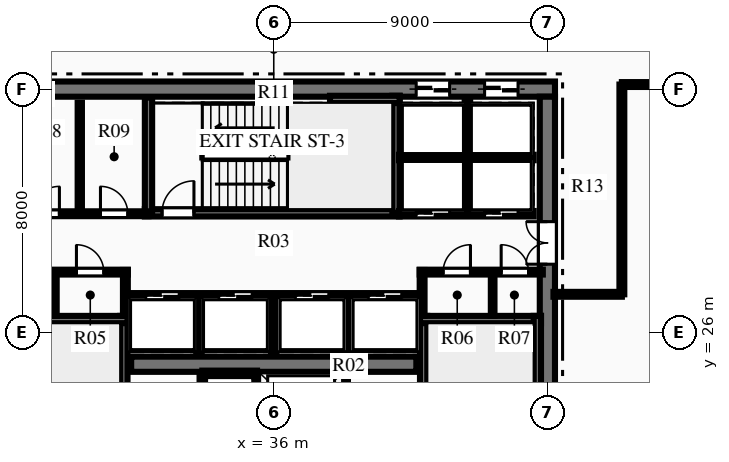
"""IFC4 building model, lengths in metres.
Left out: names, types, materials, properties, quantities, classifications, styles, units other than length and angle.
Written with IfcOpenShell. Run it as: python <this file> out.ifc"""

import sys

from ifc_helpers import new_model, si_unit, direction, frame, frame_2d, origin, place, context, subcontext, project, spatial, rectangle, extrude, element, fill, save


model = new_model("IFC4")
c1 = context("Model", 3, precision=1e-05, world=origin(), true_north=direction((0.0, 1.0)))
c2 = subcontext(c1, "Body", "Model", "MODEL_VIEW")
j1 = project(units=[si_unit("LENGTHUNIT", "METRE"), si_unit("PLANEANGLEUNIT", "RADIAN")], contexts=[c1])
p1 = place(None, origin())
s1 = spatial("IfcSite", under=j1, at=p1, CompositionType="ELEMENT")
p2 = place(p1, origin())
s2 = spatial("IfcBuilding", under=s1, at=p2, CompositionType="ELEMENT")
p3 = place(p2, frame((0.0, 0.0, 155.7)))
s3 = spatial("IfcBuildingStorey", under=s2, at=p3, CompositionType="ELEMENT", Elevation=155.7)
p4 = place(p3, frame((26.75, 34.0, 0.0), z_axis=(0.0, 0.0, 1.0), x_axis=(1.0, 0.0, 0.0)))
e1 = element("IfcWall", 1, at=p4, inside=s3, PredefinedType="SHEAR", context=c2, shape_type="SweptSolid", body=[
    extrude(rectangle(XDim=18.5, YDim=0.5, at=frame_2d((9.25, 0.0))), origin(), (0.0, 0.0, 1.0), 3.75),
])
p5 = place(p4, frame((13.935, 0.0, 0.0)))
e2 = element("IfcOpeningElement", 2, at=p5, cuts=e1, PredefinedType="OPENING", context=c2, shape_type="SweptSolid", body=[
    extrude(rectangle(XDim=1.1, YDim=2.15, at=frame_2d((0.55, 1.075))), frame((0.0, 0.26, 0.0), z_axis=(0.0, -1.0, 0.0), x_axis=(1.0, 0.0, 0.0)), (0.0, 0.0, 1.0), 0.52),
])
p6 = place(p4, frame((16.185, 0.0, 0.0)))
e3 = element("IfcOpeningElement", 3, at=p6, cuts=e1, PredefinedType="OPENING", context=c2, shape_type="SweptSolid", body=[
    extrude(rectangle(XDim=1.1, YDim=2.15, at=frame_2d((0.55, 1.075))), frame((0.0, 0.26, 0.0), z_axis=(0.0, -1.0, 0.0), x_axis=(1.0, 0.0, 0.0)), (0.0, 0.0, 1.0), 0.52),
])
p7 = place(p3, frame((45.0, 18.25, 0.0), z_axis=(0.0, 0.0, 1.0), x_axis=(0.0, 1.0, 0.0)))
e4 = element("IfcWall", 4, at=p7, inside=s3, PredefinedType="SHEAR", context=c2, shape_type="SweptSolid", body=[
    extrude(rectangle(XDim=15.5, YDim=0.5, at=frame_2d((7.75, 0.0))), origin(), (0.0, 0.0, 1.0), 3.75),
])
p8 = place(p7, frame((9.99, 0.0, 0.0)))
e5 = element("IfcOpeningElement", 5, at=p8, cuts=e4, PredefinedType="OPENING", context=c2, shape_type="SweptSolid", body=[
    extrude(rectangle(XDim=1.4, YDim=2.2, at=frame_2d((0.7, 1.1))), frame((0.0, 0.26, 0.0), z_axis=(0.0, -1.0, 0.0), x_axis=(1.0, 0.0, 0.0)), (0.0, 0.0, 1.0), 0.52),
])
p9 = place(p3, frame((31.31, 24.95, 0.0), z_axis=(0.0, 0.0, 1.0), x_axis=(1.0, 0.0, 0.0)))
e6 = element("IfcWall", 6, at=p9, inside=s3, PredefinedType="SHEAR", context=c2, shape_type="SweptSolid", body=[
    extrude(rectangle(XDim=9.38, YDim=0.5, at=frame_2d((4.69, 0.0))), origin(), (0.0, 0.0, 1.0), 3.75),
])
p10 = place(p3, frame((31.07, 18.28, 0.0), z_axis=(0.0, 0.0, 1.0), x_axis=(0.0, 1.0, 0.0)))
e7 = element("IfcWall", 7, at=p10, inside=s3, PredefinedType="SHEAR", context=c2, shape_type="SweptSolid", body=[
    extrude(rectangle(XDim=8.26, YDim=0.24, at=frame_2d((4.13, 0.0))), origin(), (0.0, 0.0, 1.0), 3.75),
])
p11 = place(p10, frame((0.365, 0.0, 0.0)))
e8 = element("IfcOpeningElement", 8, at=p11, cuts=e7, PredefinedType="OPENING", context=c2, shape_type="SweptSolid", body=[
    extrude(rectangle(XDim=1.05, YDim=2.15, at=frame_2d((0.525, 1.075))), frame((0.0, 0.13, 0.0), z_axis=(0.0, -1.0, 0.0), x_axis=(1.0, 0.0, 0.0)), (0.0, 0.0, 1.0), 0.26),
])
p12 = place(p3, frame((27.21, 26.42, 0.0), z_axis=(0.0, 0.0, 1.0), x_axis=(1.0, 0.0, 0.0)))
e9 = element("IfcWall", 9, at=p12, inside=s3, PredefinedType="SHEAR", context=c2, shape_type="SweptSolid", body=[
    extrude(rectangle(XDim=3.98, YDim=0.24, at=frame_2d((1.99, 0.0))), origin(), (0.0, 0.0, 1.0), 3.75),
])
p13 = place(p3, frame((40.93, 18.28, 0.0), z_axis=(0.0, 0.0, 1.0), x_axis=(0.0, 1.0, 0.0)))
e10 = element("IfcWall", 10, at=p13, inside=s3, PredefinedType="SHEAR", context=c2, shape_type="SweptSolid", body=[
    extrude(rectangle(XDim=8.26, YDim=0.24, at=frame_2d((4.13, 0.0))), origin(), (0.0, 0.0, 1.0), 3.75),
])
p14 = place(p13, frame((0.365, 0.0, 0.0)))
e11 = element("IfcOpeningElement", 11, at=p14, cuts=e10, PredefinedType="OPENING", context=c2, shape_type="SweptSolid", body=[
    extrude(rectangle(XDim=1.05, YDim=2.15, at=frame_2d((0.525, 1.075))), frame((0.0, 0.13, 0.0), z_axis=(0.0, -1.0, 0.0), x_axis=(1.0, 0.0, 0.0)), (0.0, 0.0, 1.0), 0.26),
])
p15 = place(p3, frame((40.81, 26.42, 0.0), z_axis=(0.0, 0.0, 1.0), x_axis=(1.0, 0.0, 0.0)))
e12 = element("IfcWall", 12, at=p15, inside=s3, PredefinedType="SHEAR", context=c2, shape_type="SweptSolid", body=[
    extrude(rectangle(XDim=3.98, YDim=0.24, at=frame_2d((1.99, 0.0))), origin(), (0.0, 0.0, 1.0), 3.75),
])
p16 = place(p3, frame((44.67, 18.28, 0.0), z_axis=(0.0, 0.0, 1.0), x_axis=(0.0, 1.0, 0.0)))
e13 = element("IfcWall", 13, at=p16, inside=s3, PredefinedType="SHEAR", context=c2, shape_type="SweptSolid", body=[
    extrude(rectangle(XDim=8.26, YDim=0.24, at=frame_2d((4.13, 0.0))), origin(), (0.0, 0.0, 1.0), 3.75),
])
p17 = place(p3, frame((31.76, 29.93, 0.0), z_axis=(0.0, 0.0, 1.0), x_axis=(1.0, 0.0, 0.0)))
e14 = element("IfcWall", 14, at=p17, inside=s3, PredefinedType="SHEAR", context=c2, shape_type="SweptSolid", body=[
    extrude(rectangle(XDim=8.38, YDim=0.24, at=frame_2d((4.19, 0.0))), origin(), (0.0, 0.0, 1.0), 3.75),
])
p18 = place(p17, frame((0.565, 0.0, 0.0)))
e15 = element("IfcOpeningElement", 15, at=p18, cuts=e14, PredefinedType="OPENING", context=c2, shape_type="SweptSolid", body=[
    extrude(rectangle(XDim=1.05, YDim=2.15, at=frame_2d((0.525, 1.075))), frame((0.0, 0.13, 0.0), z_axis=(0.0, -1.0, 0.0), x_axis=(1.0, 0.0, 0.0)), (0.0, 0.0, 1.0), 0.26),
])
p19 = place(p3, frame((31.88, 29.93, 0.0), z_axis=(0.0, 0.0, 1.0), x_axis=(0.0, 1.0, 0.0)))
e16 = element("IfcWall", 16, at=p19, inside=s3, PredefinedType="SHEAR", context=c2, shape_type="SweptSolid", body=[
    extrude(rectangle(XDim=3.79, YDim=0.24, at=frame_2d((1.895, 0.0))), origin(), (0.0, 0.0, 1.0), 3.75),
])
p20 = place(p3, frame((40.02, 29.93, 0.0), z_axis=(0.0, 0.0, 1.0), x_axis=(0.0, 1.0, 0.0)))
e17 = element("IfcWall", 17, at=p20, inside=s3, PredefinedType="SHEAR", context=c2, shape_type="SweptSolid", body=[
    extrude(rectangle(XDim=3.85, YDim=0.24, at=frame_2d((1.925, 0.0))), origin(), (0.0, 0.0, 1.0), 3.75),
])
p21 = place(p3, frame((37.85, 33.66, 0.0), z_axis=(0.0, 0.0, 1.0), x_axis=(1.0, 0.0, 0.0)))
e18 = element("IfcWall", 18, at=p21, inside=s3, PredefinedType="SHEAR", context=c2, shape_type="SweptSolid", body=[
    extrude(rectangle(XDim=2.29, YDim=0.24, at=frame_2d((1.145, 0.0))), origin(), (0.0, 0.0, 1.0), 3.75),
])
for number, where, z_axis, x_axis in (
    (19, (33.65, 22.05, 0.0), (0.0, 0.0, 1.0), (0.0, 1.0, 0.0)),
    (20, (35.45, 22.05, 0.0), (0.0, 0.0, 1.0), (0.0, 1.0, 0.0)),
):
    element("IfcWall", number, at=place(p3, frame(where, z_axis=z_axis, x_axis=x_axis)), inside=s3, PredefinedType="PARTITIONING", context=c2, shape_type="SweptSolid", body=[
        extrude(rectangle(XDim=2.6, YDim=0.18, at=frame_2d((1.3, 0.0))), origin(), (0.0, 0.0, 1.0), 3.46),
    ])
p22 = place(p3, frame((33.65, 24.65, 0.0), z_axis=(0.0, 0.0, 1.0), x_axis=(1.0, 0.0, 0.0)))
e21 = element("IfcWall", 21, at=p22, inside=s3, PredefinedType="PARTITIONING", context=c2, shape_type="SweptSolid", body=[
    extrude(rectangle(XDim=1.8, YDim=0.18, at=frame_2d((0.9, 0.0))), origin(), (0.0, 0.0, 1.0), 3.46),
])
p23 = place(p3, frame((38.35, 22.05, 0.0), z_axis=(0.0, 0.0, 1.0), x_axis=(0.0, 1.0, 0.0)))
e22 = element("IfcWall", 22, at=p23, inside=s3, PredefinedType="PARTITIONING", context=c2, shape_type="SweptSolid", body=[
    extrude(rectangle(XDim=2.6, YDim=0.18, at=frame_2d((1.3, 0.0))), origin(), (0.0, 0.0, 1.0), 3.46),
])
p24 = place(p3, frame((27.15, 27.98, 0.0), z_axis=(0.0, 0.0, 1.0), x_axis=(1.0, 0.0, 0.0)))
e23 = element("IfcWall", 23, at=p24, inside=s3, PredefinedType="PARTITIONING", context=c2, shape_type="SweptSolid", body=[
    extrude(rectangle(XDim=4.05, YDim=0.16, at=frame_2d((2.025, 0.0))), origin(), (0.0, 0.0, 1.0), 3.46),
])
p25 = place(p24, frame((0.47, 0.0, 0.0)))
e24 = element("IfcOpeningElement", 24, at=p25, cuts=e23, PredefinedType="OPENING", context=c2, shape_type="SweptSolid", body=[
    extrude(rectangle(XDim=0.9, YDim=2.15, at=frame_2d((0.45, 1.075))), frame((0.0, 0.09, 0.0), z_axis=(0.0, -1.0, 0.0), x_axis=(1.0, 0.0, 0.0)), (0.0, 0.0, 1.0), 0.18),
])
p26 = place(p24, frame((2.36, 0.0, 0.0)))
e25 = element("IfcOpeningElement", 25, at=p26, cuts=e23, PredefinedType="OPENING", context=c2, shape_type="SweptSolid", body=[
    extrude(rectangle(XDim=0.9, YDim=2.15, at=frame_2d((0.45, 1.075))), frame((0.0, 0.09, 0.0), z_axis=(0.0, -1.0, 0.0), x_axis=(1.0, 0.0, 0.0)), (0.0, 0.0, 1.0), 0.18),
])
p27 = place(p3, frame((31.12, 26.54, 0.0), z_axis=(0.0, 0.0, 1.0), x_axis=(0.0, 1.0, 0.0)))
e26 = element("IfcWall", 26, at=p27, inside=s3, PredefinedType="PARTITIONING", context=c2, shape_type="SweptSolid", body=[
    extrude(rectangle(XDim=1.51, YDim=0.16, at=frame_2d((0.755, 0.0))), origin(), (0.0, 0.0, 1.0), 3.46),
])
p28 = place(p3, frame((40.8, 27.98, 0.0), z_axis=(0.0, 0.0, 1.0), x_axis=(1.0, 0.0, 0.0)))
e27 = element("IfcWall", 27, at=p28, inside=s3, PredefinedType="PARTITIONING", context=c2, shape_type="SweptSolid", body=[
    extrude(rectangle(XDim=4.05, YDim=0.16, at=frame_2d((2.025, 0.0))), origin(), (0.0, 0.0, 1.0), 3.46),
])
p29 = place(p28, frame((0.77, 0.0, 0.0)))
e28 = element("IfcOpeningElement", 28, at=p29, cuts=e27, PredefinedType="OPENING", context=c2, shape_type="SweptSolid", body=[
    extrude(rectangle(XDim=0.9, YDim=2.15, at=frame_2d((0.45, 1.075))), frame((0.0, 0.09, 0.0), z_axis=(0.0, -1.0, 0.0), x_axis=(1.0, 0.0, 0.0)), (0.0, 0.0, 1.0), 0.18),
])
p30 = place(p28, frame((2.68, 0.0, 0.0)))
e29 = element("IfcOpeningElement", 29, at=p30, cuts=e27, PredefinedType="OPENING", context=c2, shape_type="SweptSolid", body=[
    extrude(rectangle(XDim=0.9, YDim=2.15, at=frame_2d((0.45, 1.075))), frame((0.0, 0.09, 0.0), z_axis=(0.0, -1.0, 0.0), x_axis=(1.0, 0.0, 0.0)), (0.0, 0.0, 1.0), 0.18),
])
p31 = place(p3, frame((40.88, 26.54, 0.0), z_axis=(0.0, 0.0, 1.0), x_axis=(0.0, 1.0, 0.0)))
e30 = element("IfcWall", 30, at=p31, inside=s3, PredefinedType="PARTITIONING", context=c2, shape_type="SweptSolid", body=[
    extrude(rectangle(XDim=1.51, YDim=0.16, at=frame_2d((0.755, 0.0))), origin(), (0.0, 0.0, 1.0), 3.46),
])
for number, where, z_axis, x_axis in (
    (31, (28.8, 26.54, 0.0), (0.0, 0.0, 1.0), (0.0, 1.0, 0.0)),
    (32, (43.2, 26.54, 0.0), (0.0, 0.0, 1.0), (0.0, 1.0, 0.0)),
):
    element("IfcWall", number, at=place(p3, frame(where, z_axis=z_axis, x_axis=x_axis)), inside=s3, PredefinedType="PARTITIONING", context=c2, shape_type="SweptSolid", body=[
        extrude(rectangle(XDim=1.44, YDim=0.12, at=frame_2d((0.72, 0.0))), origin(), (0.0, 0.0, 1.0), 3.46),
    ])
p32 = place(p3, frame((27.45, 29.9, 0.0), z_axis=(0.0, 0.0, 1.0), x_axis=(1.0, 0.0, 0.0)))
e33 = element("IfcWall", 33, at=p32, inside=s3, PredefinedType="PARTITIONING", context=c2, shape_type="SweptSolid", body=[
    extrude(rectangle(XDim=4.43, YDim=0.16, at=frame_2d((2.215, 0.0))), origin(), (0.0, 0.0, 1.0), 3.46),
])
p33 = place(p32, frame((0.6, 0.0, 0.0)))
e34 = element("IfcOpeningElement", 34, at=p33, cuts=e33, PredefinedType="OPENING", context=c2, shape_type="SweptSolid", body=[
    extrude(rectangle(XDim=0.9, YDim=2.15, at=frame_2d((0.45, 1.075))), frame((0.0, 0.09, 0.0), z_axis=(0.0, -1.0, 0.0), x_axis=(1.0, 0.0, 0.0)), (0.0, 0.0, 1.0), 0.18),
])
p34 = place(p32, frame((2.85, 0.0, 0.0)))
e35 = element("IfcOpeningElement", 35, at=p34, cuts=e33, PredefinedType="OPENING", context=c2, shape_type="SweptSolid", body=[
    extrude(rectangle(XDim=0.9, YDim=2.15, at=frame_2d((0.45, 1.075))), frame((0.0, 0.09, 0.0), z_axis=(0.0, -1.0, 0.0), x_axis=(1.0, 0.0, 0.0)), (0.0, 0.0, 1.0), 0.18),
])
p35 = place(p3, frame((29.62, 29.95, 0.0), z_axis=(0.0, 0.0, 1.0), x_axis=(0.0, 1.0, 0.0)))
e36 = element("IfcWall", 36, at=p35, inside=s3, PredefinedType="PARTITIONING", context=c2, shape_type="SweptSolid", body=[
    extrude(rectangle(XDim=3.6, YDim=0.14, at=frame_2d((1.8, 0.0))), origin(), (0.0, 0.0, 1.0), 3.46),
])
p36 = place(p3, frame((40.12, 29.9, 0.0), z_axis=(0.0, 0.0, 1.0), x_axis=(1.0, 0.0, 0.0)))
e37 = element("IfcWall", 37, at=p36, inside=s3, PredefinedType="PARTITIONING", context=c2, shape_type="SweptSolid", body=[
    extrude(rectangle(XDim=4.43, YDim=0.18, at=frame_2d((2.215, 0.0))), origin(), (0.0, 0.0, 1.0), 3.46),
])
p37 = place(p36, frame((0.565, 0.0, 0.0)))
e38 = element("IfcOpeningElement", 38, at=p37, cuts=e37, PredefinedType="OPENING", context=c2, shape_type="SweptSolid", body=[
    extrude(rectangle(XDim=1.1, YDim=2.15, at=frame_2d((0.55, 1.075))), frame((0.0, 0.1, 0.0), z_axis=(0.0, -1.0, 0.0), x_axis=(1.0, 0.0, 0.0)), (0.0, 0.0, 1.0), 0.2),
])
p38 = place(p36, frame((2.815, 0.0, 0.0)))
e39 = element("IfcOpeningElement", 39, at=p38, cuts=e37, PredefinedType="OPENING", context=c2, shape_type="SweptSolid", body=[
    extrude(rectangle(XDim=1.1, YDim=2.15, at=frame_2d((0.55, 1.075))), frame((0.0, 0.1, 0.0), z_axis=(0.0, -1.0, 0.0), x_axis=(1.0, 0.0, 0.0)), (0.0, 0.0, 1.0), 0.2),
])
p39 = place(p3, frame((40.12, 31.75, 0.0), z_axis=(0.0, 0.0, 1.0), x_axis=(1.0, 0.0, 0.0)))
e40 = element("IfcWall", 40, at=p39, inside=s3, PredefinedType="PARTITIONING", context=c2, shape_type="SweptSolid", body=[
    extrude(rectangle(XDim=4.43, YDim=0.18, at=frame_2d((2.215, 0.0))), origin(), (0.0, 0.0, 1.0), 3.46),
])
p40 = place(p3, frame((42.37, 29.9, 0.0), z_axis=(0.0, 0.0, 1.0), x_axis=(0.0, 1.0, 0.0)))
e41 = element("IfcWall", 41, at=p40, inside=s3, PredefinedType="PARTITIONING", context=c2, shape_type="SweptSolid", body=[
    extrude(rectangle(XDim=3.75, YDim=0.18, at=frame_2d((1.875, 0.0))), origin(), (0.0, 0.0, 1.0), 3.46),
])
p41 = place(p3, frame((31.2, 27.2, 0.0), z_axis=(0.0, 0.0, 1.0), x_axis=(1.0, 0.0, 0.0)))
e42 = element("IfcWall", 42, at=p41, inside=s3, PredefinedType="PARTITIONING", context=c2, shape_type="SweptSolid", body=[
    extrude(rectangle(XDim=9.6, YDim=0.18, at=frame_2d((4.8, 0.0))), origin(), (0.0, 0.0, 1.0), 3.46),
])
p42 = place(p41, frame((0.59, 0.0, 0.0)))
e43 = element("IfcOpeningElement", 43, at=p42, cuts=e42, PredefinedType="OPENING", context=c2, shape_type="SweptSolid", body=[
    extrude(rectangle(XDim=1.1, YDim=2.15, at=frame_2d((0.55, 1.075))), frame((0.0, 0.1, 0.0), z_axis=(0.0, -1.0, 0.0), x_axis=(1.0, 0.0, 0.0)), (0.0, 0.0, 1.0), 0.2),
])
p43 = place(p41, frame((2.99, 0.0, 0.0)))
e44 = element("IfcOpeningElement", 44, at=p43, cuts=e42, PredefinedType="OPENING", context=c2, shape_type="SweptSolid", body=[
    extrude(rectangle(XDim=1.1, YDim=2.15, at=frame_2d((0.55, 1.075))), frame((0.0, 0.1, 0.0), z_axis=(0.0, -1.0, 0.0), x_axis=(1.0, 0.0, 0.0)), (0.0, 0.0, 1.0), 0.2),
])
p44 = place(p41, frame((5.51, 0.0, 0.0)))
e45 = element("IfcOpeningElement", 45, at=p44, cuts=e42, PredefinedType="OPENING", context=c2, shape_type="SweptSolid", body=[
    extrude(rectangle(XDim=1.1, YDim=2.15, at=frame_2d((0.55, 1.075))), frame((0.0, 0.1, 0.0), z_axis=(0.0, -1.0, 0.0), x_axis=(1.0, 0.0, 0.0)), (0.0, 0.0, 1.0), 0.2),
])
p45 = place(p41, frame((7.91, 0.0, 0.0)))
e46 = element("IfcOpeningElement", 46, at=p45, cuts=e42, PredefinedType="OPENING", context=c2, shape_type="SweptSolid", body=[
    extrude(rectangle(XDim=1.1, YDim=2.15, at=frame_2d((0.55, 1.075))), frame((0.0, 0.1, 0.0), z_axis=(0.0, -1.0, 0.0), x_axis=(1.0, 0.0, 0.0)), (0.0, 0.0, 1.0), 0.2),
])
for number, where, z_axis, x_axis in (
    (47, (33.54, 25.3, 0.0), (0.0, 0.0, 1.0), (0.0, 1.0, 0.0)),
    (48, (36.0, 25.3, 0.0), (0.0, 0.0, 1.0), (0.0, 1.0, 0.0)),
    (49, (38.46, 25.3, 0.0), (0.0, 0.0, 1.0), (0.0, 1.0, 0.0)),
):
    element("IfcWall", number, at=place(p3, frame(where, z_axis=z_axis, x_axis=x_axis)), inside=s3, PredefinedType="PARTITIONING", context=c2, shape_type="SweptSolid", body=[
        extrude(rectangle(XDim=1.9, YDim=0.18, at=frame_2d((0.95, 0.0))), origin(), (0.0, 0.0, 1.0), 3.46),
    ])
p46 = place(p3, frame((47.45, 34.15, 0.0), z_axis=(0.0, 0.0, 1.0), x_axis=(1.0, 0.0, 0.0)))
e50 = element("IfcWall", 50, at=p46, inside=s3, PredefinedType="PARTITIONING", context=c2, shape_type="SweptSolid", body=[
    extrude(rectangle(XDim=6.35, YDim=0.16, at=frame_2d((3.175, 0.0))), origin(), (0.0, 0.0, 1.0), 3.46),
])
p47 = place(p3, frame((47.45, 27.25, 0.0), z_axis=(0.0, 0.0, 1.0), x_axis=(0.0, 1.0, 0.0)))
e51 = element("IfcWall", 51, at=p47, inside=s3, PredefinedType="PARTITIONING", context=c2, shape_type="SweptSolid", body=[
    extrude(rectangle(XDim=6.9, YDim=0.16, at=frame_2d((3.45, 0.0))), origin(), (0.0, 0.0, 1.0), 3.46),
])
p48 = place(p3, frame((45.2, 27.25, 0.0), z_axis=(0.0, 0.0, 1.0), x_axis=(1.0, 0.0, 0.0)))
e52 = element("IfcWall", 52, at=p48, inside=s3, PredefinedType="PARTITIONING", context=c2, shape_type="SweptSolid", body=[
    extrude(rectangle(XDim=2.25, YDim=0.16, at=frame_2d((1.125, 0.0))), origin(), (0.0, 0.0, 1.0), 3.46),
])
p49 = place(p26, origin())
e53 = element("IfcDoor", 53, at=p49, inside=s3, OperationType="SINGLE_SWING_LEFT", PredefinedType="DOOR", context=c2, shape_type="SweptSolid", body=[
    extrude(rectangle(XDim=0.9, YDim=2.15, at=frame_2d((0.45, 1.075))), frame((0.0, 0.025, 0.0), z_axis=(0.0, -1.0, 0.0), x_axis=(1.0, 0.0, 0.0)), (0.0, 0.0, 1.0), 0.05),
])
fill(e25, e53)
p50 = place(p29, origin())
e54 = element("IfcDoor", 54, at=p50, inside=s3, OperationType="SINGLE_SWING_RIGHT", PredefinedType="DOOR", context=c2, shape_type="SweptSolid", body=[
    extrude(rectangle(XDim=0.9, YDim=2.15, at=frame_2d((0.45, 1.075))), frame((0.0, 0.025, 0.0), z_axis=(0.0, -1.0, 0.0), x_axis=(1.0, 0.0, 0.0)), (0.0, 0.0, 1.0), 0.05),
])
fill(e28, e54)
p51 = place(p30, origin())
e55 = element("IfcDoor", 55, at=p51, inside=s3, OperationType="SINGLE_SWING_LEFT", PredefinedType="DOOR", context=c2, shape_type="SweptSolid", body=[
    extrude(rectangle(XDim=0.9, YDim=2.15, at=frame_2d((0.45, 1.075))), frame((0.0, 0.025, 0.0), z_axis=(0.0, -1.0, 0.0), x_axis=(1.0, 0.0, 0.0)), (0.0, 0.0, 1.0), 0.05),
])
fill(e29, e55)
p52 = place(p33, origin())
e56 = element("IfcDoor", 56, at=p52, inside=s3, OperationType="SINGLE_SWING_RIGHT", PredefinedType="DOOR", context=c2, shape_type="SweptSolid", body=[
    extrude(rectangle(XDim=0.9, YDim=2.15, at=frame_2d((0.45, 1.075))), frame((0.0, 0.025, 0.0), z_axis=(0.0, -1.0, 0.0), x_axis=(1.0, 0.0, 0.0)), (0.0, 0.0, 1.0), 0.05),
])
fill(e34, e56)
p53 = place(p34, origin())
e57 = element("IfcDoor", 57, at=p53, inside=s3, OperationType="SINGLE_SWING_LEFT", PredefinedType="DOOR", context=c2, shape_type="SweptSolid", body=[
    extrude(rectangle(XDim=0.9, YDim=2.15, at=frame_2d((0.45, 1.075))), frame((0.0, 0.025, 0.0), z_axis=(0.0, -1.0, 0.0), x_axis=(1.0, 0.0, 0.0)), (0.0, 0.0, 1.0), 0.05),
])
fill(e35, e57)
p54 = place(p18, origin())
e58 = element("IfcDoor", 58, at=p54, inside=s3, OperationType="SINGLE_SWING_RIGHT", PredefinedType="DOOR", context=c2, shape_type="SweptSolid", body=[
    extrude(rectangle(XDim=1.05, YDim=2.15, at=frame_2d((0.525, 1.075))), frame((0.0, 0.025, 0.0), z_axis=(0.0, -1.0, 0.0), x_axis=(1.0, 0.0, 0.0)), (0.0, 0.0, 1.0), 0.05),
])
fill(e15, e58)
p55 = place(p8, origin())
e59 = element("IfcDoor", 59, at=p55, inside=s3, OperationType="DOUBLE_DOOR_SINGLE_SWING", PredefinedType="DOOR", context=c2, shape_type="SweptSolid", body=[
    extrude(rectangle(XDim=1.4, YDim=2.2, at=frame_2d((0.7, 1.1))), frame((0.0, 0.025, 0.0), z_axis=(0.0, -1.0, 0.0), x_axis=(1.0, 0.0, 0.0)), (0.0, 0.0, 1.0), 0.05),
])
fill(e5, e59)
p56 = place(p37, origin())
e60 = element("IfcDoor", 60, at=p56, inside=s3, OperationType="SLIDING_TO_LEFT", PredefinedType="DOOR", context=c2, shape_type="SweptSolid", body=[
    extrude(rectangle(XDim=1.1, YDim=2.15, at=frame_2d((0.55, 1.075))), frame((0.0, 0.025, 0.0), z_axis=(0.0, -1.0, 0.0), x_axis=(1.0, 0.0, 0.0)), (0.0, 0.0, 1.0), 0.05),
])
fill(e38, e60)
p57 = place(p38, origin())
e61 = element("IfcDoor", 61, at=p57, inside=s3, OperationType="SLIDING_TO_LEFT", PredefinedType="DOOR", context=c2, shape_type="SweptSolid", body=[
    extrude(rectangle(XDim=1.1, YDim=2.15, at=frame_2d((0.55, 1.075))), frame((0.0, 0.025, 0.0), z_axis=(0.0, -1.0, 0.0), x_axis=(1.0, 0.0, 0.0)), (0.0, 0.0, 1.0), 0.05),
])
fill(e39, e61)
p58 = place(p5, origin())
e62 = element("IfcDoor", 62, at=p58, inside=s3, OperationType="SLIDING_TO_LEFT", PredefinedType="DOOR", context=c2, shape_type="SweptSolid", body=[
    extrude(rectangle(XDim=1.1, YDim=2.15, at=frame_2d((0.55, 1.075))), frame((0.0, 0.025, 0.0), z_axis=(0.0, -1.0, 0.0), x_axis=(1.0, 0.0, 0.0)), (0.0, 0.0, 1.0), 0.05),
])
fill(e2, e62)
p59 = place(p6, origin())
e63 = element("IfcDoor", 63, at=p59, inside=s3, OperationType="SLIDING_TO_LEFT", PredefinedType="DOOR", context=c2, shape_type="SweptSolid", body=[
    extrude(rectangle(XDim=1.1, YDim=2.15, at=frame_2d((0.55, 1.075))), frame((0.0, 0.025, 0.0), z_axis=(0.0, -1.0, 0.0), x_axis=(1.0, 0.0, 0.0)), (0.0, 0.0, 1.0), 0.05),
])
fill(e3, e63)
p60 = place(p42, origin())
e64 = element("IfcDoor", 64, at=p60, inside=s3, OperationType="SLIDING_TO_LEFT", PredefinedType="DOOR", context=c2, shape_type="SweptSolid", body=[
    extrude(rectangle(XDim=1.1, YDim=2.15, at=frame_2d((0.55, 1.075))), frame((0.0, 0.025, 0.0), z_axis=(0.0, -1.0, 0.0), x_axis=(1.0, 0.0, 0.0)), (0.0, 0.0, 1.0), 0.05),
])
fill(e43, e64)
p61 = place(p43, origin())
e65 = element("IfcDoor", 65, at=p61, inside=s3, OperationType="SLIDING_TO_LEFT", PredefinedType="DOOR", context=c2, shape_type="SweptSolid", body=[
    extrude(rectangle(XDim=1.1, YDim=2.15, at=frame_2d((0.55, 1.075))), frame((0.0, 0.025, 0.0), z_axis=(0.0, -1.0, 0.0), x_axis=(1.0, 0.0, 0.0)), (0.0, 0.0, 1.0), 0.05),
])
fill(e44, e65)
p62 = place(p44, origin())
e66 = element("IfcDoor", 66, at=p62, inside=s3, OperationType="SLIDING_TO_LEFT", PredefinedType="DOOR", context=c2, shape_type="SweptSolid", body=[
    extrude(rectangle(XDim=1.1, YDim=2.15, at=frame_2d((0.55, 1.075))), frame((0.0, 0.025, 0.0), z_axis=(0.0, -1.0, 0.0), x_axis=(1.0, 0.0, 0.0)), (0.0, 0.0, 1.0), 0.05),
])
fill(e45, e66)
p63 = place(p45, origin())
e67 = element("IfcDoor", 67, at=p63, inside=s3, OperationType="SLIDING_TO_LEFT", PredefinedType="DOOR", context=c2, shape_type="SweptSolid", body=[
    extrude(rectangle(XDim=1.1, YDim=2.15, at=frame_2d((0.55, 1.075))), frame((0.0, 0.025, 0.0), z_axis=(0.0, -1.0, 0.0), x_axis=(1.0, 0.0, 0.0)), (0.0, 0.0, 1.0), 0.05),
])
fill(e46, e67)
save(model, sys.argv[1])
